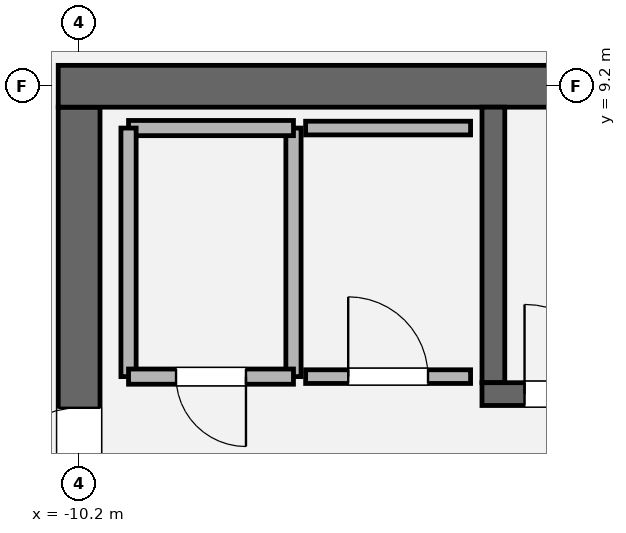
"""IFC4 building model, lengths in metres.
Left out: names, types, materials, properties, quantities, classifications, styles, units other than length and angle.
Written with IfcOpenShell. Run it as: python <this file> out.ifc"""

import sys

from ifc_helpers import new_model, si_unit, direction, frame, frame_2d, origin, place, context, subcontext, project, spatial, rectangle, extrude, element, fill, save


model = new_model("IFC4")
c1 = context("Model", 3, precision=1e-05, world=origin(), true_north=direction((0.0, 1.0)))
c2 = subcontext(c1, "Body", "Model", "MODEL_VIEW")
j1 = project(units=[si_unit("LENGTHUNIT", "METRE"), si_unit("PLANEANGLEUNIT", "RADIAN")], contexts=[c1])
p1 = place(None, origin())
s1 = spatial("IfcSite", under=j1, at=p1, CompositionType="ELEMENT")
p2 = place(p1, origin())
s2 = spatial("IfcBuilding", under=s1, at=p2, CompositionType="ELEMENT")
p3 = place(p2, frame((0.0, 0.0, 296.4)))
s3 = spatial("IfcBuildingStorey", under=s2, at=p3, CompositionType="ELEMENT", Elevation=296.4)
p4 = place(p3, frame((-10.2, -8.925, 0.0), z_axis=(0.0, 0.0, 1.0), x_axis=(0.0, 1.0, 0.0)))
e1 = element("IfcWall", 1, at=p4, inside=s3, PredefinedType="SHEAR", context=c2, shape_type="SweptSolid", body=[
    extrude(rectangle(XDim=17.85, YDim=0.55, at=frame_2d((8.925, 0.0))), origin(), (0.0, 0.0, 1.0), 4.2),
])
p5 = place(p4, frame((12.715, 0.0, 0.0)))
e2 = element("IfcOpeningElement", 2, at=p5, cuts=e1, PredefinedType="OPENING", context=c2, shape_type="SweptSolid", body=[
    extrude(rectangle(XDim=1.18, YDim=2.2, at=frame_2d((0.59, 1.1))), frame((0.0, 0.285, 0.0), z_axis=(0.0, -1.0, 0.0), x_axis=(1.0, 0.0, 0.0)), (0.0, 0.0, 1.0), 0.57),
])
p6 = place(p3, frame((-10.475, 9.2, 0.0), z_axis=(0.0, 0.0, 1.0), x_axis=(1.0, 0.0, 0.0)))
e3 = element("IfcWall", 3, at=p6, inside=s3, PredefinedType="SHEAR", context=c2, shape_type="SweptSolid", body=[
    extrude(rectangle(XDim=20.95, YDim=0.55, at=frame_2d((10.475, 0.0))), origin(), (0.0, 0.0, 1.0), 4.2),
])
p7 = place(p3, frame((-4.75, 5.3, 0.0), z_axis=(0.0, 0.0, 1.0), x_axis=(0.0, 1.0, 0.0)))
e4 = element("IfcWall", 4, at=p7, inside=s3, PredefinedType="SOLIDWALL", context=c2, shape_type="SweptSolid", body=[
    extrude(rectangle(XDim=3.625, YDim=0.3, at=frame_2d((1.812, 0.0))), origin(), (0.0, 0.0, 1.0), 4.2),
])
p8 = place(p3, frame((-4.9, 5.15, 0.0), z_axis=(0.0, 0.0, 1.0), x_axis=(1.0, 0.0, 0.0)))
e5 = element("IfcWall", 5, at=p8, inside=s3, PredefinedType="SOLIDWALL", context=c2, shape_type="SweptSolid", body=[
    extrude(rectangle(XDim=9.8, YDim=0.3, at=frame_2d((4.9, 0.0))), origin(), (0.0, 0.0, 1.0), 4.2),
])
p9 = place(p8, frame((0.56, 0.0, 0.0)))
e6 = element("IfcOpeningElement", 6, at=p9, cuts=e5, PredefinedType="OPENING", context=c2, shape_type="SweptSolid", body=[
    extrude(rectangle(XDim=1.18, YDim=2.2, at=frame_2d((0.59, 1.1))), frame((0.0, 0.16, 0.0), z_axis=(0.0, -1.0, 0.0), x_axis=(1.0, 0.0, 0.0)), (0.0, 0.0, 1.0), 0.32),
])
p10 = place(p3, frame((-7.38, 5.38, 0.0), z_axis=(0.0, 0.0, 1.0), x_axis=(0.0, 1.0, 0.0)))
e7 = element("IfcWall", 7, at=p10, inside=s3, PredefinedType="SOLIDWALL", context=c2, shape_type="SweptSolid", body=[
    extrude(rectangle(XDim=3.27, YDim=0.2, at=frame_2d((1.635, 0.0))), origin(), (0.0, 0.0, 1.0), 4.0),
])
p11 = place(p3, frame((-7.38, 8.65, 0.0), z_axis=(0.0, 0.0, 1.0), x_axis=(-1.0, 0.0, 0.0)))
e8 = element("IfcWall", 8, at=p11, inside=s3, PredefinedType="SOLIDWALL", context=c2, shape_type="SweptSolid", body=[
    extrude(rectangle(XDim=2.17, YDim=0.2, at=frame_2d((1.085, 0.0))), origin(), (0.0, 0.0, 1.0), 4.0),
])
p12 = place(p3, frame((-9.55, 8.65, 0.0), z_axis=(0.0, 0.0, 1.0), x_axis=(0.0, -1.0, 0.0)))
e9 = element("IfcWall", 9, at=p12, inside=s3, PredefinedType="SOLIDWALL", context=c2, shape_type="SweptSolid", body=[
    extrude(rectangle(XDim=3.27, YDim=0.2, at=frame_2d((1.635, 0.0))), origin(), (0.0, 0.0, 1.0), 4.0),
])
p13 = place(p3, frame((-9.55, 5.38, 0.0), z_axis=(0.0, 0.0, 1.0), x_axis=(1.0, 0.0, 0.0)))
e10 = element("IfcWall", 10, at=p13, inside=s3, PredefinedType="SOLIDWALL", context=c2, shape_type="SweptSolid", body=[
    extrude(rectangle(XDim=2.17, YDim=0.2, at=frame_2d((1.085, 0.0))), origin(), (0.0, 0.0, 1.0), 4.0),
])
p14 = place(p13, frame((0.625, 0.0, 0.0)))
e11 = element("IfcOpeningElement", 11, at=p14, cuts=e10, PredefinedType="OPENING", context=c2, shape_type="SweptSolid", body=[
    extrude(rectangle(XDim=0.92, YDim=2.1, at=frame_2d((0.46, 1.05))), frame((0.0, 0.11, 0.0), z_axis=(0.0, -1.0, 0.0), x_axis=(1.0, 0.0, 0.0)), (0.0, 0.0, 1.0), 0.22),
])
p15 = place(p3, frame((-5.05, 8.65, 0.0), z_axis=(0.0, 0.0, 1.0), x_axis=(-1.0, 0.0, 0.0)))
e12 = element("IfcWall", 12, at=p15, inside=s3, PredefinedType="PARTITIONING", context=c2, shape_type="SweptSolid", body=[
    extrude(rectangle(XDim=2.17, YDim=0.18, at=frame_2d((1.085, 0.0))), origin(), (0.0, 0.0, 1.0), 4.0),
])
p16 = place(p3, frame((-7.22, 5.38, 0.0), z_axis=(0.0, 0.0, 1.0), x_axis=(1.0, 0.0, 0.0)))
e13 = element("IfcWall", 13, at=p16, inside=s3, PredefinedType="PARTITIONING", context=c2, shape_type="SweptSolid", body=[
    extrude(rectangle(XDim=2.17, YDim=0.18, at=frame_2d((1.085, 0.0))), origin(), (0.0, 0.0, 1.0), 4.0),
])
p17 = place(p16, frame((0.56, 0.0, 0.0)))
e14 = element("IfcOpeningElement", 14, at=p17, cuts=e13, PredefinedType="OPENING", context=c2, shape_type="SweptSolid", body=[
    extrude(rectangle(XDim=1.05, YDim=2.2, at=frame_2d((0.525, 1.1))), frame((0.0, 0.1, 0.0), z_axis=(0.0, -1.0, 0.0), x_axis=(1.0, 0.0, 0.0)), (0.0, 0.0, 1.0), 0.2),
])
p18 = place(p9, origin())
e15 = element("IfcDoor", 15, at=p18, inside=s3, OperationType="SINGLE_SWING_LEFT", PredefinedType="DOOR", context=c2, shape_type="SweptSolid", body=[
    extrude(rectangle(XDim=1.18, YDim=2.2, at=frame_2d((0.59, 1.1))), frame((0.0, 0.025, 0.0), z_axis=(0.0, -1.0, 0.0), x_axis=(1.0, 0.0, 0.0)), (0.0, 0.0, 1.0), 0.05),
])
fill(e6, e15)
p19 = place(p5, origin())
e16 = element("IfcDoor", 16, at=p19, inside=s3, OperationType="SINGLE_SWING_LEFT", PredefinedType="DOOR", context=c2, shape_type="SweptSolid", body=[
    extrude(rectangle(XDim=1.18, YDim=2.2, at=frame_2d((0.59, 1.1))), frame((0.0, 0.025, 0.0), z_axis=(0.0, -1.0, 0.0), x_axis=(1.0, 0.0, 0.0)), (0.0, 0.0, 1.0), 0.05),
])
fill(e2, e16)
p20 = place(p14, origin())
e17 = element("IfcDoor", 17, at=p20, inside=s3, OperationType="SINGLE_SWING_RIGHT", PredefinedType="DOOR", context=c2, shape_type="SweptSolid", body=[
    extrude(rectangle(XDim=0.92, YDim=2.1, at=frame_2d((0.46, 1.05))), frame((0.0, 0.025, 0.0), z_axis=(0.0, -1.0, 0.0), x_axis=(1.0, 0.0, 0.0)), (0.0, 0.0, 1.0), 0.05),
])
fill(e11, e17)
p21 = place(p17, origin())
e18 = element("IfcDoor", 18, at=p21, inside=s3, OperationType="SINGLE_SWING_LEFT", PredefinedType="DOOR", context=c2, shape_type="SweptSolid", body=[
    extrude(rectangle(XDim=1.05, YDim=2.2, at=frame_2d((0.525, 1.1))), frame((0.0, 0.025, 0.0), z_axis=(0.0, -1.0, 0.0), x_axis=(1.0, 0.0, 0.0)), (0.0, 0.0, 1.0), 0.05),
])
fill(e14, e18)
save(model, sys.argv[1])
